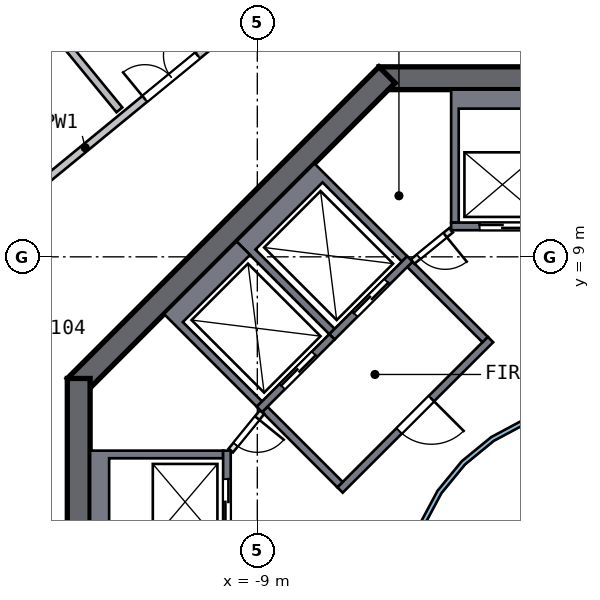
"""IFC4 building model, lengths in metres.
Left out: names, types, materials, properties, quantities, classifications, styles, units other than length and angle.
Written with IfcOpenShell. Run it as: python <this file> out.ifc"""

import sys

from ifc_helpers import new_model, si_unit, direction, frame, frame_2d, origin, place, context, subcontext, project, spatial, polyline, rectangle, outline, extrude, element, fill, save


model = new_model("IFC4")
c1 = context("Model", 3, precision=1e-05, world=origin(), true_north=direction((0.0, 1.0)))
c2 = subcontext(c1, "Body", "Model", "MODEL_VIEW")
j1 = project(units=[si_unit("LENGTHUNIT", "METRE"), si_unit("PLANEANGLEUNIT", "RADIAN")], contexts=[c1])
p1 = place(None, origin())
s1 = spatial("IfcSite", under=j1, at=p1, CompositionType="ELEMENT")
p2 = place(p1, origin())
s2 = spatial("IfcBuilding", under=s1, at=p2, CompositionType="ELEMENT")
p3 = place(p2, frame((0.0, 0.0, 194.0)))
s3 = spatial("IfcBuildingStorey", under=s2, at=p3, CompositionType="ELEMENT", Elevation=194.0)
p4 = place(p3, frame((5.799, 13.7, 0.0), z_axis=(0.0, 0.0, 1.0), x_axis=(-1.0, 0.0, 0.0)))
e1 = element("IfcWall", 1, at=p4, inside=s3, PredefinedType="SHEAR", context=c2, shape_type="SweptSolid", body=[
    extrude(rectangle(XDim=11.598, YDim=0.6, at=frame_2d((5.799, 0.0))), origin(), (0.0, 0.0, 1.0), 3.5),
])
p5 = place(p4, frame((4.899, 0.0, 0.0)))
e2 = element("IfcOpeningElement", 2, at=p5, cuts=e1, PredefinedType="OPENING", context=c2, shape_type="SweptSolid", body=[
    extrude(rectangle(XDim=1.8, YDim=2.1, at=frame_2d((0.9, 1.05))), frame((0.0, 0.31, 0.0), z_axis=(0.0, -1.0, 0.0), x_axis=(1.0, 0.0, 0.0)), (0.0, 0.0, 1.0), 0.62),
])
p6 = place(p3, frame((-5.587, 13.788, 0.0), z_axis=(0.0, 0.0, 1.0), x_axis=(-0.707106781, -0.707106781, 0.0)))
e3 = element("IfcWall", 3, at=p6, inside=s3, PredefinedType="SHEAR", context=c2, shape_type="SweptSolid", body=[
    extrude(rectangle(XDim=11.598, YDim=0.6, at=frame_2d((5.799, 0.0))), origin(), (0.0, 0.0, 1.0), 3.5),
])
p7 = place(p3, frame((-13.7, 5.799, 0.0), z_axis=(0.0, 0.0, 1.0), x_axis=(0.0, -1.0, 0.0)))
e4 = element("IfcWall", 4, at=p7, inside=s3, PredefinedType="SHEAR", context=c2, shape_type="SweptSolid", body=[
    extrude(rectangle(XDim=11.598, YDim=0.6, at=frame_2d((5.799, 0.0))), origin(), (0.0, 0.0, 1.0), 3.5),
])
p8 = place(p7, frame((4.899, 0.0, 0.0)))
e5 = element("IfcOpeningElement", 5, at=p8, cuts=e4, PredefinedType="OPENING", context=c2, shape_type="SweptSolid", body=[
    extrude(rectangle(XDim=1.8, YDim=2.1, at=frame_2d((0.9, 1.05))), frame((0.0, 0.31, 0.0), z_axis=(0.0, -1.0, 0.0), x_axis=(1.0, 0.0, 0.0)), (0.0, 0.0, 1.0), 0.62),
])
p9 = place(p3, origin())
e6 = element("IfcWall", 6, at=p9, inside=s3, PredefinedType="SOLIDWALL", context=c2, shape_type="SweptSolid", body=[
    extrude(outline(polyline([(-3.9, 13.4), (-1.2, 13.4), (-1.2, 9.9), (-1.4, 9.9), (-1.4, 12.9), (-3.7, 12.9), (-3.7, 9.9), (-3.9, 9.9), (-3.9, 13.4)])), origin(), (0.0, 0.0, 1.0), 3.19),
])
p10 = place(p3, frame((-1.2, 9.8, 0.0), z_axis=(0.0, 0.0, 1.0), x_axis=(-1.0, 0.0, 0.0)))
e7 = element("IfcWall", 7, at=p10, inside=s3, PredefinedType="SOLIDWALL", context=c2, shape_type="SweptSolid", body=[
    extrude(rectangle(XDim=2.7, YDim=0.2, at=frame_2d((1.35, 0.0))), origin(), (0.0, 0.0, 1.0), 3.19),
])
p11 = place(p10, frame((0.75, 0.0, 0.0)))
e8 = element("IfcOpeningElement", 8, at=p11, cuts=e7, PredefinedType="OPENING", context=c2, shape_type="SweptSolid", body=[
    extrude(rectangle(XDim=1.2, YDim=2.1, at=frame_2d((0.6, 1.05))), frame((0.0, 0.11, 0.0), z_axis=(0.0, -1.0, 0.0), x_axis=(1.0, 0.0, 0.0)), (0.0, 0.0, 1.0), 0.22),
])
p12 = place(p3, origin())
e9 = element("IfcWall", 9, at=p12, inside=s3, PredefinedType="SOLIDWALL", context=c2, shape_type="SweptSolid", body=[
    extrude(outline(polyline([(-13.4, 3.9), (-9.9, 3.9), (-9.9, 3.7), (-12.9, 3.7), (-12.9, 1.4), (-9.9, 1.4), (-9.9, 1.2), (-13.4, 1.2), (-13.4, 3.9)])), origin(), (0.0, 0.0, 1.0), 3.19),
])
p13 = place(p3, frame((-9.8, 1.2, 0.0), z_axis=(0.0, 0.0, 1.0), x_axis=(0.0, 1.0, 0.0)))
e10 = element("IfcWall", 10, at=p13, inside=s3, PredefinedType="SOLIDWALL", context=c2, shape_type="SweptSolid", body=[
    extrude(rectangle(XDim=2.7, YDim=0.2, at=frame_2d((1.35, 0.0))), origin(), (0.0, 0.0, 1.0), 3.19),
])
p14 = place(p13, frame((0.75, 0.0, 0.0)))
e11 = element("IfcOpeningElement", 11, at=p14, cuts=e10, PredefinedType="OPENING", context=c2, shape_type="SweptSolid", body=[
    extrude(rectangle(XDim=1.2, YDim=2.1, at=frame_2d((0.6, 1.05))), frame((0.0, 0.11, 0.0), z_axis=(0.0, -1.0, 0.0), x_axis=(1.0, 0.0, 0.0)), (0.0, 0.0, 1.0), 0.22),
])
p15 = place(p3, origin())
e12 = element("IfcWall", 12, at=p15, inside=s3, PredefinedType="SOLIDWALL", context=c2, shape_type="SweptSolid", body=[
    extrude(outline(polyline([(-9.546, 9.405), (-7.495, 11.455), (-5.056, 9.016), (-5.197, 8.874), (-7.283, 10.96), (-9.051, 9.192), (-6.965, 7.106), (-7.106, 6.965), (-9.546, 9.405)])), origin(), (0.0, 0.0, 1.0), 3.19),
])
p16 = place(p3, frame((-4.985, 8.945, 0.0), z_axis=(0.0, 0.0, 1.0), x_axis=(-0.707106781, -0.707106781, 0.0)))
e13 = element("IfcWall", 13, at=p16, inside=s3, PredefinedType="SOLIDWALL", context=c2, shape_type="SweptSolid", body=[
    extrude(rectangle(XDim=2.9, YDim=0.2, at=frame_2d((1.45, 0.0))), origin(), (0.0, 0.0, 1.0), 3.19),
])
p17 = place(p16, frame((0.85, 0.0, 0.0)))
e14 = element("IfcOpeningElement", 14, at=p17, cuts=e13, PredefinedType="OPENING", context=c2, shape_type="SweptSolid", body=[
    extrude(rectangle(XDim=1.2, YDim=2.1, at=frame_2d((0.6, 1.05))), frame((0.0, 0.11, 0.0), z_axis=(0.0, -1.0, 0.0), x_axis=(1.0, 0.0, 0.0)), (0.0, 0.0, 1.0), 0.22),
])
p18 = place(p3, origin())
e15 = element("IfcWall", 15, at=p18, inside=s3, PredefinedType="SOLIDWALL", context=c2, shape_type="SweptSolid", body=[
    extrude(outline(polyline([(-11.455, 7.495), (-9.546, 9.405), (-9.192, 9.051), (-10.96, 7.283), (-8.874, 5.197), (-9.016, 5.056), (-11.455, 7.495)])), origin(), (0.0, 0.0, 1.0), 3.19),
])
p19 = place(p3, frame((-7.036, 6.894, 0.0), z_axis=(0.0, 0.0, 1.0), x_axis=(-0.707106781, -0.707106781, 0.0)))
e16 = element("IfcWall", 16, at=p19, inside=s3, PredefinedType="SOLIDWALL", context=c2, shape_type="SweptSolid", body=[
    extrude(rectangle(XDim=2.7, YDim=0.2, at=frame_2d((1.35, 0.0))), origin(), (0.0, 0.0, 1.0), 3.19),
])
p20 = place(p19, frame((0.65, 0.0, 0.0)))
e17 = element("IfcOpeningElement", 17, at=p20, cuts=e16, PredefinedType="OPENING", context=c2, shape_type="SweptSolid", body=[
    extrude(rectangle(XDim=1.2, YDim=2.1, at=frame_2d((0.6, 1.05))), frame((0.0, 0.11, 0.0), z_axis=(0.0, -1.0, 0.0), x_axis=(1.0, 0.0, 0.0)), (0.0, 0.0, 1.0), 0.22),
])
p21 = place(p3, frame((-2.864, 6.823, 0.0), z_axis=(0.0, 0.0, 1.0), x_axis=(-0.707106781, -0.707106781, 0.0)))
e18 = element("IfcWall", 18, at=p21, inside=s3, PredefinedType="SOLIDWALL", context=c2, shape_type="SweptSolid", body=[
    extrude(rectangle(XDim=5.6, YDim=0.2, at=frame_2d((2.8, 0.0))), origin(), (0.0, 0.0, 1.0), 3.19),
])
p22 = place(p21, frame((2.2, 0.0, 0.0)))
e19 = element("IfcOpeningElement", 19, at=p22, cuts=e18, PredefinedType="OPENING", context=c2, shape_type="SweptSolid", body=[
    extrude(rectangle(XDim=1.2, YDim=2.1, at=frame_2d((0.6, 1.05))), frame((0.0, 0.11, 0.0), z_axis=(0.0, -1.0, 0.0), x_axis=(1.0, 0.0, 0.0)), (0.0, 0.0, 1.0), 0.22),
])
for number, where, z_axis, x_axis in (
    (20, (-3.005, 6.823, 0.0), (0.0, 0.0, 1.0), (-0.707, 0.707, 0.0)),
    (21, (-6.823, 3.005, 0.0), (0.0, 0.0, 1.0), (-0.707, 0.707, 0.0)),
):
    element("IfcWall", number, at=place(p3, frame(where, z_axis=z_axis, x_axis=x_axis)), inside=s3, PredefinedType="SOLIDWALL", context=c2, shape_type="SweptSolid", body=[
        extrude(rectangle(XDim=2.8, YDim=0.2, at=frame_2d((1.4, 0.0))), origin(), (0.0, 0.0, 1.0), 3.19),
    ])
p23 = place(p3, frame((-3.9, 9.7, 0.0), z_axis=(0.0, 0.0, 1.0), x_axis=(-0.775559878, -0.631274009, 0.0)))
e22 = element("IfcWall", 22, at=p23, inside=s3, PredefinedType="PARTITIONING", context=c2, shape_type="SweptSolid", body=[
    extrude(rectangle(XDim=1.308, YDim=0.15, at=frame_2d((0.654, 0.0))), origin(), (0.0, 0.0, 1.0), 3.19),
])
p24 = place(p23, frame((0.204, 0.0, 0.0)))
e23 = element("IfcOpeningElement", 23, at=p24, cuts=e22, PredefinedType="OPENING", context=c2, shape_type="SweptSolid", body=[
    extrude(rectangle(XDim=0.9, YDim=2.1, at=frame_2d((0.45, 1.05))), frame((0.0, 0.085, 0.0), z_axis=(0.0, -1.0, 0.0), x_axis=(1.0, 0.0, 0.0)), (0.0, 0.0, 1.0), 0.17),
])
p25 = place(p3, frame((-8.874, 4.914, 0.0), z_axis=(0.0, 0.0, 1.0), x_axis=(-0.631274009, -0.775559878, 0.0)))
e24 = element("IfcWall", 24, at=p25, inside=s3, PredefinedType="PARTITIONING", context=c2, shape_type="SweptSolid", body=[
    extrude(rectangle(XDim=1.308, YDim=0.15, at=frame_2d((0.654, 0.0))), origin(), (0.0, 0.0, 1.0), 3.19),
])
p26 = place(p25, frame((0.204, 0.0, 0.0)))
e25 = element("IfcOpeningElement", 25, at=p26, cuts=e24, PredefinedType="OPENING", context=c2, shape_type="SweptSolid", body=[
    extrude(rectangle(XDim=0.9, YDim=2.1, at=frame_2d((0.45, 1.05))), frame((0.0, 0.085, 0.0), z_axis=(0.0, -1.0, 0.0), x_axis=(1.0, 0.0, 0.0)), (0.0, 0.0, 1.0), 0.17),
])
p27 = place(p3, origin())
e26 = element("IfcWall", 26, at=p27, inside=s3, PredefinedType="SOLIDWALL", context=c2, shape_type="SweptSolid", body=[
    extrude(outline(polyline([(5.021, -0.999), (4.73, -1.959), (4.257, -2.844), (3.62, -3.62), (2.844, -4.257), (1.959, -4.73), (0.999, -5.021), (0.0, -5.12), (-0.999, -5.021), (-1.959, -4.73), (-2.844, -4.257), (-3.62, -3.62), (-4.257, -2.844), (-4.73, -1.959), (-5.021, -0.999), (-5.12, 0.0), (-5.021, 0.999), (-4.73, 1.959), (-4.257, 2.844), (-3.62, 3.62), (-2.844, 4.257), (-1.959, 4.73), (-0.999, 5.021), (0.0, 5.12), (0.999, 5.021), (1.959, 4.73), (2.844, 4.257), (3.62, 3.62), (4.257, 2.844), (4.73, 1.959), (5.021, 0.999), (5.12, 0.0), (5.021, -0.999)]), holes=[polyline([(4.904, 0.976), (4.619, 1.913), (4.157, 2.778), (3.535, 3.535), (2.778, 4.157), (1.913, 4.619), (0.976, 4.904), (0.0, 5.0), (-0.976, 4.904), (-1.913, 4.619), (-2.778, 4.157), (-3.535, 3.535), (-4.157, 2.778), (-4.619, 1.913), (-4.904, 0.976), (-5.0, 0.0), (-4.904, -0.976), (-4.619, -1.913), (-4.157, -2.778), (-3.535, -3.535), (-2.778, -4.157), (-1.913, -4.619), (-0.976, -4.904), (0.0, -5.0), (0.976, -4.904), (1.913, -4.619), (2.778, -4.157), (3.535, -3.535), (4.157, -2.778), (4.619, -1.913), (4.904, -0.976), (5.0, 0.0), (4.904, 0.976)])]), origin(), (0.0, 0.0, 1.0), 3.19),
])
p28 = place(p3, frame((-14.941, 10.713, 0.0), z_axis=(0.0, 0.0, 1.0), x_axis=(0.773179127, 0.634187699, 0.0)))
e27 = element("IfcWall", 27, at=p28, inside=s3, PredefinedType="SOLIDWALL", context=c2, shape_type="SweptSolid", body=[
    extrude(rectangle(XDim=9.317, YDim=0.2, at=frame_2d((4.658, 0.0))), origin(), (0.0, 0.0, 1.0), 3.19),
])
p29 = place(p28, frame((3.854, 0.0, 0.0)))
e28 = element("IfcOpeningElement", 28, at=p29, cuts=e27, PredefinedType="OPENING", context=c2, shape_type="SweptSolid", body=[
    extrude(rectangle(XDim=1.8, YDim=2.1, at=frame_2d((0.9, 1.05))), frame((0.0, 0.11, 0.0), z_axis=(0.0, -1.0, 0.0), x_axis=(1.0, 0.0, 0.0)), (0.0, 0.0, 1.0), 0.22),
])
p30 = place(p3, frame((-12.629, 12.868, 0.0), z_axis=(0.0, 0.0, 1.0), x_axis=(-0.634195474, 0.773172749, 0.0)))
e29 = element("IfcWall", 29, at=p30, inside=s3, PredefinedType="SOLIDWALL", context=c2, shape_type="SweptSolid", body=[
    extrude(rectangle(XDim=14.486, YDim=0.2, at=frame_2d((7.243, 0.0))), origin(), (0.0, 0.0, 1.0), 3.19),
])
p31 = place(p30, frame((4.5, 0.0, 0.0)))
e30 = element("IfcOpeningElement", 30, at=p31, cuts=e29, PredefinedType="OPENING", context=c2, shape_type="SweptSolid", body=[
    extrude(rectangle(XDim=1.0, YDim=2.1, at=frame_2d((0.5, 1.05))), frame((0.0, 0.11, 0.0), z_axis=(0.0, -1.0, 0.0), x_axis=(1.0, 0.0, 0.0)), (0.0, 0.0, 1.0), 0.22),
])
p32 = place(p11, origin())
e31 = element("IfcDoor", 31, at=p32, inside=s3, OperationType="DOUBLE_DOOR_SLIDING", PredefinedType="DOOR", context=c2, shape_type="SweptSolid", body=[
    extrude(rectangle(XDim=1.2, YDim=2.1, at=frame_2d((0.6, 1.05))), frame((0.0, 0.025, 0.0), z_axis=(0.0, -1.0, 0.0), x_axis=(1.0, 0.0, 0.0)), (0.0, 0.0, 1.0), 0.05),
])
fill(e8, e31)
p33 = place(p14, origin())
e32 = element("IfcDoor", 32, at=p33, inside=s3, OperationType="DOUBLE_DOOR_SLIDING", PredefinedType="DOOR", context=c2, shape_type="SweptSolid", body=[
    extrude(rectangle(XDim=1.2, YDim=2.1, at=frame_2d((0.6, 1.05))), frame((0.0, 0.025, 0.0), z_axis=(0.0, -1.0, 0.0), x_axis=(1.0, 0.0, 0.0)), (0.0, 0.0, 1.0), 0.05),
])
fill(e11, e32)
p34 = place(p17, origin())
e33 = element("IfcDoor", 33, at=p34, inside=s3, OperationType="DOUBLE_DOOR_SLIDING", PredefinedType="DOOR", context=c2, shape_type="SweptSolid", body=[
    extrude(rectangle(XDim=1.2, YDim=2.1, at=frame_2d((0.6, 1.05))), frame((0.0, 0.025, 0.0), z_axis=(0.0, -1.0, 0.0), x_axis=(1.0, 0.0, 0.0)), (0.0, 0.0, 1.0), 0.05),
])
fill(e14, e33)
p35 = place(p20, origin())
e34 = element("IfcDoor", 34, at=p35, inside=s3, OperationType="DOUBLE_DOOR_SLIDING", PredefinedType="DOOR", context=c2, shape_type="SweptSolid", body=[
    extrude(rectangle(XDim=1.2, YDim=2.1, at=frame_2d((0.6, 1.05))), frame((0.0, 0.025, 0.0), z_axis=(0.0, -1.0, 0.0), x_axis=(1.0, 0.0, 0.0)), (0.0, 0.0, 1.0), 0.05),
])
fill(e17, e34)
p36 = place(p22, origin())
e35 = element("IfcDoor", 35, at=p36, inside=s3, OperationType="SINGLE_SWING_LEFT", PredefinedType="DOOR", context=c2, shape_type="SweptSolid", body=[
    extrude(rectangle(XDim=1.2, YDim=2.1, at=frame_2d((0.6, 1.05))), frame((0.0, 0.025, 0.0), z_axis=(0.0, -1.0, 0.0), x_axis=(1.0, 0.0, 0.0)), (0.0, 0.0, 1.0), 0.05),
])
fill(e19, e35)
p37 = place(p24, origin())
e36 = element("IfcDoor", 36, at=p37, inside=s3, OperationType="SINGLE_SWING_LEFT", PredefinedType="DOOR", context=c2, shape_type="SweptSolid", body=[
    extrude(rectangle(XDim=0.9, YDim=2.1, at=frame_2d((0.45, 1.05))), frame((0.0, 0.025, 0.0), z_axis=(0.0, -1.0, 0.0), x_axis=(1.0, 0.0, 0.0)), (0.0, 0.0, 1.0), 0.05),
])
fill(e23, e36)
p38 = place(p26, origin())
e37 = element("IfcDoor", 37, at=p38, inside=s3, OperationType="SINGLE_SWING_LEFT", PredefinedType="DOOR", context=c2, shape_type="SweptSolid", body=[
    extrude(rectangle(XDim=0.9, YDim=2.1, at=frame_2d((0.45, 1.05))), frame((0.0, 0.025, 0.0), z_axis=(0.0, -1.0, 0.0), x_axis=(1.0, 0.0, 0.0)), (0.0, 0.0, 1.0), 0.05),
])
fill(e25, e37)
p39 = place(p29, origin())
e38 = element("IfcDoor", 38, at=p39, inside=s3, OperationType="DOUBLE_DOOR_SINGLE_SWING", PredefinedType="DOOR", context=c2, shape_type="SweptSolid", body=[
    extrude(rectangle(XDim=1.8, YDim=2.1, at=frame_2d((0.9, 1.05))), frame((0.0, 0.025, 0.0), z_axis=(0.0, -1.0, 0.0), x_axis=(1.0, 0.0, 0.0)), (0.0, 0.0, 1.0), 0.05),
])
fill(e28, e38)
save(model, sys.argv[1])
